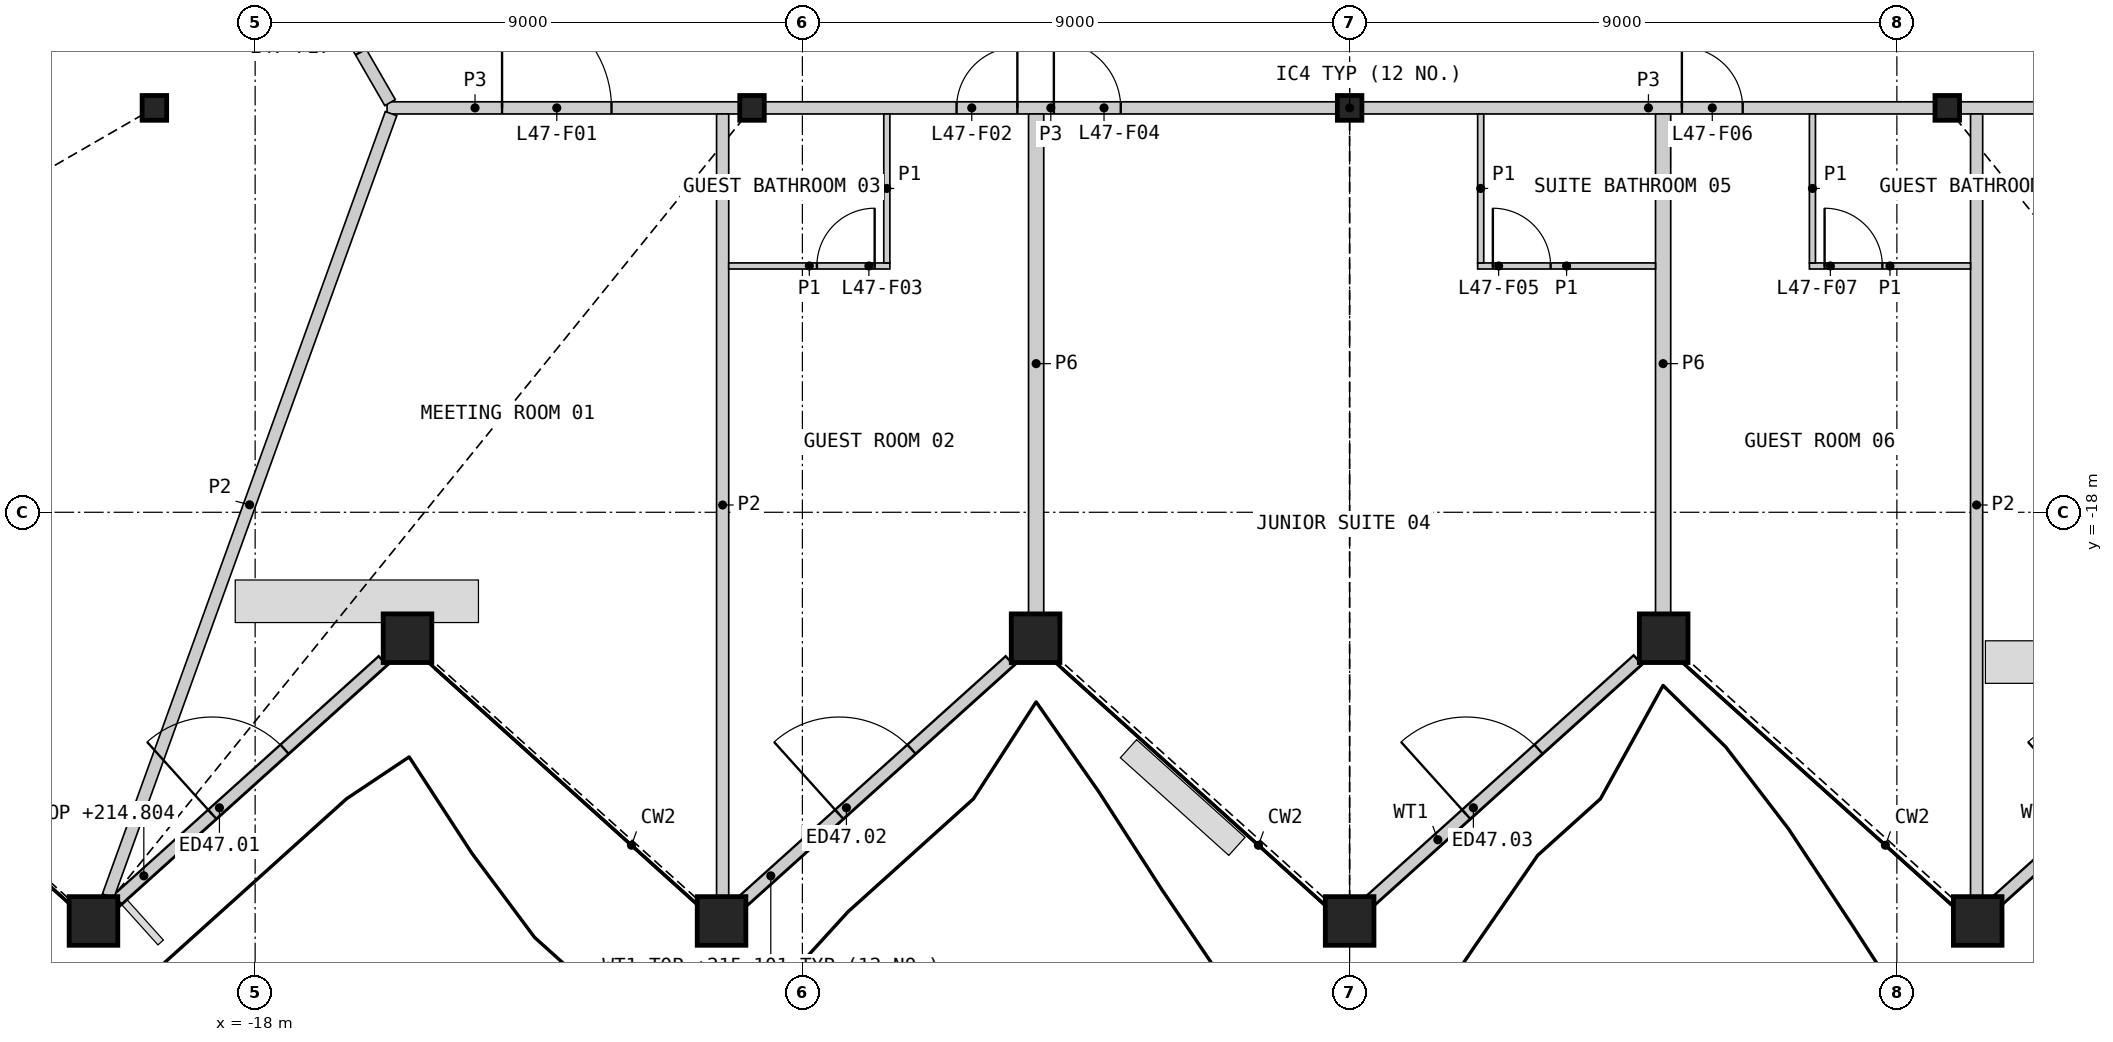
"""IFC4 building model, lengths in metres.
Left out: names, types, materials, properties, quantities, classifications, styles, units other than length and angle.
Written with IfcOpenShell. Run it as: python <this file> out.ifc"""

import sys

from ifc_helpers import new_model, si_unit, direction, frame, frame_2d, origin, origin_2d, place, context, subcontext, project, spatial, rectangle, hollow_rectangle, i_section, extrude, element, fill, save


model = new_model("IFC4")
c1 = context("Model", 3, precision=1e-05, world=origin(), true_north=direction((0.0, 1.0)))
c2 = subcontext(c1, "Body", "Model", "MODEL_VIEW")
j1 = project(units=[si_unit("LENGTHUNIT", "METRE"), si_unit("PLANEANGLEUNIT", "RADIAN")], contexts=[c1])
p1 = place(None, origin())
s1 = spatial("IfcSite", under=j1, at=p1, CompositionType="ELEMENT")
p2 = place(p1, origin())
s2 = spatial("IfcBuilding", under=s1, at=p2, CompositionType="ELEMENT")
p3 = place(p2, frame((0.0, 0.0, 212.4)))
s3 = spatial("IfcBuildingStorey", under=s2, at=p3, CompositionType="ELEMENT", Elevation=212.4)
for number, where, z_axis, x_axis in (
    (1, (-20.659, -24.722, 0.0), (0.0, 0.0, 1.0), (1.0, 0.0, 0.0)),
    (2, (-15.494, -20.071, 0.0), (0.0, 0.0, 1.0), (1.0, 0.0, 0.0)),
    (3, (-10.329, -24.722, 0.0), (0.0, 0.0, 1.0), (1.0, 0.0, 0.0)),
    (4, (-5.165, -20.071, 0.0), (0.0, 0.0, 1.0), (1.0, 0.0, 0.0)),
    (5, (0.0, -24.722, 0.0), (0.0, 0.0, 1.0), (1.0, 0.0, 0.0)),
    (6, (5.165, -20.071, 0.0), (0.0, 0.0, 1.0), (1.0, 0.0, 0.0)),
    (7, (10.329, -24.722, 0.0), (0.0, 0.0, 1.0), (1.0, 0.0, 0.0)),
):
    element("IfcColumn", number, at=place(p3, frame(where, z_axis=z_axis, x_axis=x_axis)), inside=s3, PredefinedType="COLUMN", context=c2, shape_type="SweptSolid", body=[
        extrude(hollow_rectangle(XDim=0.8, YDim=0.8, WallThickness=0.05, at=origin_2d()), origin(), (0.0, 0.0, 1.0), 3.6),
    ])
for number, where, z_axis, x_axis in (
    (8, (-19.657, -11.349, 0.0), (0.0, 0.0, 1.0), (1.0, 0.0, 0.0)),
    (9, (-9.828, -11.349, 0.0), (0.0, 0.0, 1.0), (1.0, 0.0, 0.0)),
    (10, (0.0, -11.349, 0.0), (0.0, 0.0, 1.0), (1.0, 0.0, 0.0)),
    (11, (9.828, -11.349, 0.0), (0.0, 0.0, 1.0), (1.0, 0.0, 0.0)),
):
    element("IfcColumn", number, at=place(p3, frame(where, z_axis=z_axis, x_axis=x_axis)), inside=s3, PredefinedType="COLUMN", context=c2, shape_type="SweptSolid", body=[
        extrude(i_section(OverallWidth=0.404, OverallDepth=0.407, WebThickness=0.027, FlangeThickness=0.044, at=origin_2d()), origin(), (0.0, 0.0, 1.0), 3.6),
    ])
p4 = place(p3, frame((-20.267, -24.373, 0.0), z_axis=(0.0, 0.0, 1.0), x_axis=(0.743163950832, 0.669109364891, 0.0)))
e12 = element("IfcWall", 12, at=p4, inside=s3, PredefinedType="SOLIDWALL", context=c2, shape_type="SweptSolid", body=[
    extrude(rectangle(XDim=5.875, YDim=0.2, at=frame_2d((2.938, 0.0))), origin(), (0.0, 0.0, 1.0), 2.404),
])
p5 = place(p4, frame((2.101, 0.0, 0.0)))
e13 = element("IfcOpeningElement", 13, at=p5, cuts=e12, PredefinedType="OPENING", context=c2, shape_type="SweptSolid", body=[
    extrude(rectangle(XDim=1.6, YDim=2.4, at=frame_2d((0.8, 1.2))), frame((0.0, 0.11, 0.0), z_axis=(0.0, -1.0, 0.0), x_axis=(1.0, 0.0, 0.0)), (0.0, 0.0, 1.0), 0.22),
])
p6 = place(p3, frame((-9.956, -24.373, 0.0), z_axis=(0.0, 0.0, 1.0), x_axis=(0.743163950832, 0.669109364891, 0.0)))
e14 = element("IfcWall", 14, at=p6, inside=s3, PredefinedType="SOLIDWALL", context=c2, shape_type="SweptSolid", body=[
    extrude(rectangle(XDim=5.875, YDim=0.2, at=frame_2d((2.938, 0.0))), origin(), (0.0, 0.0, 1.0), 2.701),
])
p7 = place(p6, frame((2.101, 0.0, 0.0)))
e15 = element("IfcOpeningElement", 15, at=p7, cuts=e14, PredefinedType="OPENING", context=c2, shape_type="SweptSolid", body=[
    extrude(rectangle(XDim=1.6, YDim=2.4, at=frame_2d((0.8, 1.2))), frame((0.0, 0.11, 0.0), z_axis=(0.0, -1.0, 0.0), x_axis=(1.0, 0.0, 0.0)), (0.0, 0.0, 1.0), 0.22),
])
p8 = place(p3, frame((0.355, -24.373, 0.0), z_axis=(0.0, 0.0, 1.0), x_axis=(0.743166509731, 0.669106522771, 0.0)))
e16 = element("IfcWall", 16, at=p8, inside=s3, PredefinedType="SOLIDWALL", context=c2, shape_type="SweptSolid", body=[
    extrude(rectangle(XDim=5.897, YDim=0.2, at=frame_2d((2.949, 0.0))), origin(), (0.0, 0.0, 1.0), 2.701),
])
p9 = place(p8, frame((2.101, 0.0, 0.0)))
e17 = element("IfcOpeningElement", 17, at=p9, cuts=e16, PredefinedType="OPENING", context=c2, shape_type="SweptSolid", body=[
    extrude(rectangle(XDim=1.6, YDim=2.4, at=frame_2d((0.8, 1.2))), frame((0.0, 0.11, 0.0), z_axis=(0.0, -1.0, 0.0), x_axis=(1.0, 0.0, 0.0)), (0.0, 0.0, 1.0), 0.22),
])
p10 = place(p3, frame((10.667, -24.373, 0.0), z_axis=(0.0, 0.0, 1.0), x_axis=(0.743154671439, 0.669119671149, 0.0)))
e18 = element("IfcWall", 18, at=p10, inside=s3, PredefinedType="SOLIDWALL", context=c2, shape_type="SweptSolid", body=[
    extrude(rectangle(XDim=5.919, YDim=0.2, at=frame_2d((2.959, 0.0))), origin(), (0.0, 0.0, 1.0), 2.701),
])
p11 = place(p10, frame((2.101, 0.0, 0.0)))
e19 = element("IfcOpeningElement", 19, at=p11, cuts=e18, PredefinedType="OPENING", context=c2, shape_type="SweptSolid", body=[
    extrude(rectangle(XDim=1.6, YDim=2.4, at=frame_2d((0.8, 1.2))), frame((0.0, 0.11, 0.0), z_axis=(0.0, -1.0, 0.0), x_axis=(1.0, 0.0, 0.0)), (0.0, 0.0, 1.0), 0.22),
])
p12 = place(p3, frame((-9.615, -11.349, 0.0), z_axis=(0.0, 0.0, 1.0), x_axis=(1.0, 0.0, 0.0)))
e20 = element("IfcWall", 20, at=p12, inside=s3, PredefinedType="PARTITIONING", context=c2, shape_type="SweptSolid", body=[
    extrude(rectangle(XDim=9.401, YDim=0.2, at=frame_2d((4.701, 0.0))), origin(), (0.0, 0.0, 1.0), 3.25),
])
p13 = place(p12, frame((3.15, 0.0, 0.0)))
e21 = element("IfcOpeningElement", 21, at=p13, cuts=e20, PredefinedType="OPENING", context=c2, shape_type="SweptSolid", body=[
    extrude(rectangle(XDim=1.0, YDim=2.1, at=frame_2d((0.5, 1.05))), frame((0.0, 0.11, 0.0), z_axis=(0.0, -1.0, 0.0), x_axis=(1.0, 0.0, 0.0)), (0.0, 0.0, 1.0), 0.22),
])
p14 = place(p12, frame((4.751, 0.0, 0.0)))
e22 = element("IfcOpeningElement", 22, at=p14, cuts=e20, PredefinedType="OPENING", context=c2, shape_type="SweptSolid", body=[
    extrude(rectangle(XDim=1.1, YDim=2.1, at=frame_2d((0.55, 1.05))), frame((0.0, 0.11, 0.0), z_axis=(0.0, -1.0, 0.0), x_axis=(1.0, 0.0, 0.0)), (0.0, 0.0, 1.0), 0.22),
])
p15 = place(p3, frame((0.214, -11.349, 0.0), z_axis=(0.0, 0.0, 1.0), x_axis=(1.0, 0.0, 0.0)))
e23 = element("IfcWall", 23, at=p15, inside=s3, PredefinedType="PARTITIONING", context=c2, shape_type="SweptSolid", body=[
    extrude(rectangle(XDim=9.401, YDim=0.2, at=frame_2d((4.701, 0.0))), origin(), (0.0, 0.0, 1.0), 3.25),
])
p16 = place(p15, frame((5.251, 0.0, 0.0)))
e24 = element("IfcOpeningElement", 24, at=p16, cuts=e23, PredefinedType="OPENING", context=c2, shape_type="SweptSolid", body=[
    extrude(rectangle(XDim=1.0, YDim=2.1, at=frame_2d((0.5, 1.05))), frame((0.0, 0.11, 0.0), z_axis=(0.0, -1.0, 0.0), x_axis=(1.0, 0.0, 0.0)), (0.0, 0.0, 1.0), 0.22),
])
for number, where, z_axis, x_axis in (
    (25, (-5.156, -19.661, 0.0), (0.0, 0.0, 1.0), (0.0, 1.0, 0.0)),
    (26, (5.156, -19.661, 0.0), (0.0, 0.0, 1.0), (0.0, 1.0, 0.0)),
):
    element("IfcWall", number, at=place(p3, frame(where, z_axis=z_axis, x_axis=x_axis)), inside=s3, PredefinedType="PARTITIONING", context=c2, shape_type="SweptSolid", body=[
        extrude(rectangle(XDim=8.212, YDim=0.25, at=frame_2d((4.106, 0.0))), origin(), (0.0, 0.0, 1.0), 2.404),
    ])
p17 = place(p3, frame((-15.831, -11.349, 0.0), z_axis=(0.0, 0.0, 1.0), x_axis=(1.0, 0.0, 0.0)))
e27 = element("IfcWall", 27, at=p17, inside=s3, PredefinedType="PARTITIONING", context=c2, shape_type="SweptSolid", body=[
    extrude(rectangle(XDim=5.789, YDim=0.2, at=frame_2d((2.894, 0.0))), origin(), (0.0, 0.0, 1.0), 3.25),
])
p18 = place(p17, frame((1.892, 0.0, 0.0)))
e28 = element("IfcOpeningElement", 28, at=p18, cuts=e27, PredefinedType="OPENING", context=c2, shape_type="SweptSolid", body=[
    extrude(rectangle(XDim=1.8, YDim=2.1, at=frame_2d((0.9, 1.05))), frame((0.0, 0.11, 0.0), z_axis=(0.0, -1.0, 0.0), x_axis=(1.0, 0.0, 0.0)), (0.0, 0.0, 1.0), 0.22),
])
p19 = place(p3, frame((10.042, -11.349, 0.0), z_axis=(0.0, 0.0, 1.0), x_axis=(1.0, 0.0, 0.0)))
e29 = element("IfcWall", 29, at=p19, inside=s3, PredefinedType="PARTITIONING", context=c2, shape_type="SweptSolid", body=[
    extrude(rectangle(XDim=5.789, YDim=0.2, at=frame_2d((2.894, 0.0))), origin(), (0.0, 0.0, 1.0), 3.25),
])
p20 = place(p19, frame((2.097, 0.0, 0.0)))
e30 = element("IfcOpeningElement", 30, at=p20, cuts=e29, PredefinedType="OPENING", context=c2, shape_type="SweptSolid", body=[
    extrude(rectangle(XDim=1.8, YDim=2.1, at=frame_2d((0.9, 1.05))), frame((0.0, 0.11, 0.0), z_axis=(0.0, -1.0, 0.0), x_axis=(1.0, 0.0, 0.0)), (0.0, 0.0, 1.0), 0.22),
])
p21 = place(p3, frame((-17.644, -8.035, 0.0), z_axis=(0.0, 0.0, 1.0), x_axis=(0.499958791762, -0.866049194065, 0.0)))
e31 = element("IfcWall", 31, at=p21, inside=s3, PredefinedType="PARTITIONING", context=c2, shape_type="SweptSolid", body=[
    extrude(rectangle(XDim=3.726, YDim=0.2, at=frame_2d((1.863, 0.0))), origin(), (0.0, 0.0, 1.0), 3.25),
])
p22 = place(p21, frame((0.963, 0.0, 0.0)))
e32 = element("IfcOpeningElement", 32, at=p22, cuts=e31, PredefinedType="OPENING", context=c2, shape_type="SweptSolid", body=[
    extrude(rectangle(XDim=1.8, YDim=2.1, at=frame_2d((0.9, 1.05))), frame((0.0, 0.11, 0.0), z_axis=(0.0, -1.0, 0.0), x_axis=(1.0, 0.0, 0.0)), (0.0, 0.0, 1.0), 0.22),
])
p23 = place(p3, frame((-20.418, -24.312, 0.0), z_axis=(0.0, 0.0, 1.0), x_axis=(0.340057865258, 0.940404513109, 0.0)))
e33 = element("IfcWall", 33, at=p23, inside=s3, PredefinedType="PARTITIONING", context=c2, shape_type="SweptSolid", body=[
    extrude(rectangle(XDim=13.684, YDim=0.2, at=frame_2d((6.842, 0.0))), origin(), (0.0, 0.0, 1.0), 2.404),
])
for number, where, z_axis, x_axis in (
    (34, (-10.311, -24.312, 0.0), (0.0, 0.0, 1.0), (0.0, 1.0, 0.0)),
    (35, (10.311, -24.312, 0.0), (0.0, 0.0, 1.0), (0.0, 1.0, 0.0)),
):
    element("IfcWall", number, at=place(p3, frame(where, z_axis=z_axis, x_axis=x_axis)), inside=s3, PredefinedType="PARTITIONING", context=c2, shape_type="SweptSolid", body=[
        extrude(rectangle(XDim=12.863, YDim=0.2, at=frame_2d((6.431, 0.0))), origin(), (0.0, 0.0, 1.0), 2.404),
    ])
p24 = place(p3, frame((2.106, -13.949, 0.0), z_axis=(0.0, 0.0, 1.0), x_axis=(1.0, 0.0, 0.0)))
e36 = element("IfcWall", 36, at=p24, inside=s3, PredefinedType="PARTITIONING", context=c2, shape_type="SweptSolid", body=[
    extrude(rectangle(XDim=2.925, YDim=0.1, at=frame_2d((1.462, 0.0))), origin(), (0.0, 0.0, 1.0), 2.404),
])
p25 = place(p24, frame((0.25, 0.0, 0.0)))
e37 = element("IfcOpeningElement", 37, at=p25, cuts=e36, PredefinedType="OPENING", context=c2, shape_type="SweptSolid", body=[
    extrude(rectangle(XDim=0.95, YDim=2.1, at=frame_2d((0.475, 1.05))), frame((0.0, 0.06, 0.0), z_axis=(0.0, -1.0, 0.0), x_axis=(1.0, 0.0, 0.0)), (0.0, 0.0, 1.0), 0.12),
])
p26 = place(p3, frame((-10.211, -13.949, 0.0), z_axis=(0.0, 0.0, 1.0), x_axis=(1.0, 0.0, 0.0)))
e38 = element("IfcWall", 38, at=p26, inside=s3, PredefinedType="PARTITIONING", context=c2, shape_type="SweptSolid", body=[
    extrude(rectangle(XDim=2.65, YDim=0.1, at=frame_2d((1.325, 0.0))), origin(), (0.0, 0.0, 1.0), 2.404),
])
p27 = place(p26, frame((1.45, 0.0, 0.0)))
e39 = element("IfcOpeningElement", 39, at=p27, cuts=e38, PredefinedType="OPENING", context=c2, shape_type="SweptSolid", body=[
    extrude(rectangle(XDim=0.95, YDim=2.1, at=frame_2d((0.475, 1.05))), frame((0.0, 0.06, 0.0), z_axis=(0.0, -1.0, 0.0), x_axis=(1.0, 0.0, 0.0)), (0.0, 0.0, 1.0), 0.12),
])
p28 = place(p3, frame((7.561, -13.949, 0.0), z_axis=(0.0, 0.0, 1.0), x_axis=(1.0, 0.0, 0.0)))
e40 = element("IfcWall", 40, at=p28, inside=s3, PredefinedType="PARTITIONING", context=c2, shape_type="SweptSolid", body=[
    extrude(rectangle(XDim=2.65, YDim=0.1, at=frame_2d((1.325, 0.0))), origin(), (0.0, 0.0, 1.0), 2.404),
])
p29 = place(p28, frame((0.25, 0.0, 0.0)))
e41 = element("IfcOpeningElement", 41, at=p29, cuts=e40, PredefinedType="OPENING", context=c2, shape_type="SweptSolid", body=[
    extrude(rectangle(XDim=0.95, YDim=2.1, at=frame_2d((0.475, 1.05))), frame((0.0, 0.06, 0.0), z_axis=(0.0, -1.0, 0.0), x_axis=(1.0, 0.0, 0.0)), (0.0, 0.0, 1.0), 0.12),
])
for number, where, z_axis, x_axis in (
    (42, (-7.611, -13.899, 0.0), (0.0, 0.0, 1.0), (0.0, 1.0, 0.0)),
    (43, (2.156, -13.899, 0.0), (0.0, 0.0, 1.0), (0.0, 1.0, 0.0)),
    (44, (7.611, -13.899, 0.0), (0.0, 0.0, 1.0), (0.0, 1.0, 0.0)),
):
    element("IfcWall", number, at=place(p3, frame(where, z_axis=z_axis, x_axis=x_axis)), inside=s3, PredefinedType="PARTITIONING", context=c2, shape_type="SweptSolid", body=[
        extrude(rectangle(XDim=2.45, YDim=0.1, at=frame_2d((1.225, 0.0))), origin(), (0.0, 0.0, 1.0), 2.404),
    ])
p30 = place(p5, origin())
e45 = element("IfcDoor", 45, at=p30, inside=s3, OperationType="DOUBLE_DOOR_SINGLE_SWING", PredefinedType="DOOR", context=c2, shape_type="SweptSolid", body=[
    extrude(rectangle(XDim=1.6, YDim=2.4, at=frame_2d((0.8, 1.2))), frame((0.0, 0.025, 0.0), z_axis=(0.0, -1.0, 0.0), x_axis=(1.0, 0.0, 0.0)), (0.0, 0.0, 1.0), 0.05),
])
fill(e13, e45)
p31 = place(p7, origin())
e46 = element("IfcDoor", 46, at=p31, inside=s3, OperationType="DOUBLE_DOOR_SINGLE_SWING", PredefinedType="DOOR", context=c2, shape_type="SweptSolid", body=[
    extrude(rectangle(XDim=1.6, YDim=2.4, at=frame_2d((0.8, 1.2))), frame((0.0, 0.025, 0.0), z_axis=(0.0, -1.0, 0.0), x_axis=(1.0, 0.0, 0.0)), (0.0, 0.0, 1.0), 0.05),
])
fill(e15, e46)
p32 = place(p9, origin())
e47 = element("IfcDoor", 47, at=p32, inside=s3, OperationType="DOUBLE_DOOR_SINGLE_SWING", PredefinedType="DOOR", context=c2, shape_type="SweptSolid", body=[
    extrude(rectangle(XDim=1.6, YDim=2.4, at=frame_2d((0.8, 1.2))), frame((0.0, 0.025, 0.0), z_axis=(0.0, -1.0, 0.0), x_axis=(1.0, 0.0, 0.0)), (0.0, 0.0, 1.0), 0.05),
])
fill(e17, e47)
p33 = place(p18, origin())
e48 = element("IfcDoor", 48, at=p33, inside=s3, OperationType="DOUBLE_DOOR_SINGLE_SWING", PredefinedType="DOOR", context=c2, shape_type="SweptSolid", body=[
    extrude(rectangle(XDim=1.8, YDim=2.1, at=frame_2d((0.9, 1.05))), frame((0.0, 0.025, 0.0), z_axis=(0.0, -1.0, 0.0), x_axis=(1.0, 0.0, 0.0)), (0.0, 0.0, 1.0), 0.05),
])
fill(e28, e48)
p34 = place(p13, origin())
e49 = element("IfcDoor", 49, at=p34, inside=s3, OperationType="SINGLE_SWING_RIGHT", PredefinedType="DOOR", context=c2, shape_type="SweptSolid", body=[
    extrude(rectangle(XDim=1.0, YDim=2.1, at=frame_2d((0.5, 1.05))), frame((0.0, 0.025, 0.0), z_axis=(0.0, -1.0, 0.0), x_axis=(1.0, 0.0, 0.0)), (0.0, 0.0, 1.0), 0.05),
])
fill(e21, e49)
p35 = place(p27, origin())
e50 = element("IfcDoor", 50, at=p35, inside=s3, OperationType="SINGLE_SWING_RIGHT", PredefinedType="DOOR", context=c2, shape_type="SweptSolid", body=[
    extrude(rectangle(XDim=0.95, YDim=2.1, at=frame_2d((0.475, 1.05))), frame((0.0, 0.025, 0.0), z_axis=(0.0, -1.0, 0.0), x_axis=(1.0, 0.0, 0.0)), (0.0, 0.0, 1.0), 0.05),
])
fill(e39, e50)
p36 = place(p14, origin())
e51 = element("IfcDoor", 51, at=p36, inside=s3, OperationType="SINGLE_SWING_LEFT", PredefinedType="DOOR", context=c2, shape_type="SweptSolid", body=[
    extrude(rectangle(XDim=1.1, YDim=2.1, at=frame_2d((0.55, 1.05))), frame((0.0, 0.025, 0.0), z_axis=(0.0, -1.0, 0.0), x_axis=(1.0, 0.0, 0.0)), (0.0, 0.0, 1.0), 0.05),
])
fill(e22, e51)
p37 = place(p25, origin())
e52 = element("IfcDoor", 52, at=p37, inside=s3, OperationType="SINGLE_SWING_LEFT", PredefinedType="DOOR", context=c2, shape_type="SweptSolid", body=[
    extrude(rectangle(XDim=0.95, YDim=2.1, at=frame_2d((0.475, 1.05))), frame((0.0, 0.025, 0.0), z_axis=(0.0, -1.0, 0.0), x_axis=(1.0, 0.0, 0.0)), (0.0, 0.0, 1.0), 0.05),
])
fill(e37, e52)
p38 = place(p16, origin())
e53 = element("IfcDoor", 53, at=p38, inside=s3, OperationType="SINGLE_SWING_LEFT", PredefinedType="DOOR", context=c2, shape_type="SweptSolid", body=[
    extrude(rectangle(XDim=1.0, YDim=2.1, at=frame_2d((0.5, 1.05))), frame((0.0, 0.025, 0.0), z_axis=(0.0, -1.0, 0.0), x_axis=(1.0, 0.0, 0.0)), (0.0, 0.0, 1.0), 0.05),
])
fill(e24, e53)
p39 = place(p29, origin())
e54 = element("IfcDoor", 54, at=p39, inside=s3, OperationType="SINGLE_SWING_LEFT", PredefinedType="DOOR", context=c2, shape_type="SweptSolid", body=[
    extrude(rectangle(XDim=0.95, YDim=2.1, at=frame_2d((0.475, 1.05))), frame((0.0, 0.025, 0.0), z_axis=(0.0, -1.0, 0.0), x_axis=(1.0, 0.0, 0.0)), (0.0, 0.0, 1.0), 0.05),
])
fill(e41, e54)
p40 = place(p22, origin())
e55 = element("IfcDoor", 55, at=p40, inside=s3, OperationType="DOUBLE_DOOR_SINGLE_SWING", PredefinedType="DOOR", context=c2, shape_type="SweptSolid", body=[
    extrude(rectangle(XDim=1.8, YDim=2.1, at=frame_2d((0.9, 1.05))), frame((0.0, 0.025, 0.0), z_axis=(0.0, -1.0, 0.0), x_axis=(1.0, 0.0, 0.0)), (0.0, 0.0, 1.0), 0.05),
])
fill(e32, e55)
save(model, sys.argv[1])
